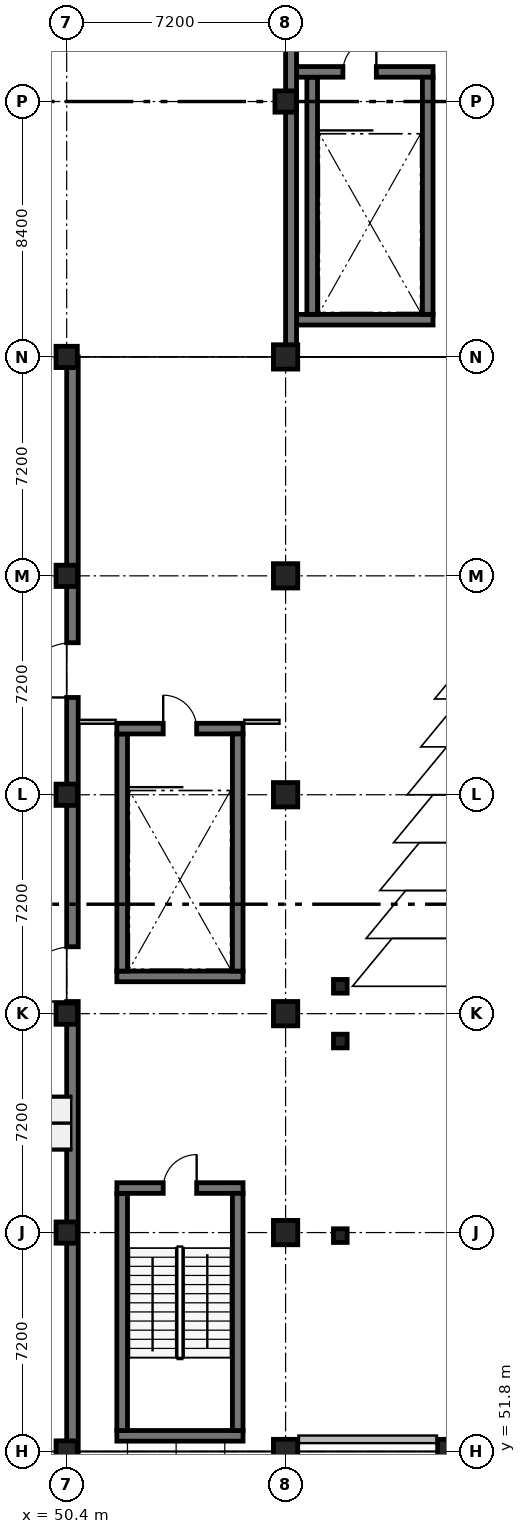
"""IFC4 building model, lengths in metres.
Left out: names, types, materials, properties, quantities, classifications, styles, units other than length and angle.
Written with IfcOpenShell. Run it as: python <this file> out.ifc"""

import sys

from ifc_helpers import new_model, si_unit, direction, frame, frame_2d, origin, origin_2d, place, context, subcontext, project, spatial, rectangle, extrude, element, fill, save


model = new_model("IFC4")
c1 = context("Model", 3, precision=1e-05, world=origin(), true_north=direction((0.0, 1.0)))
c2 = subcontext(c1, "Body", "Model", "MODEL_VIEW")
j1 = project(units=[si_unit("LENGTHUNIT", "METRE"), si_unit("PLANEANGLEUNIT", "RADIAN")], contexts=[c1])
p1 = place(None, origin())
s1 = spatial("IfcSite", under=j1, at=p1, CompositionType="ELEMENT")
p2 = place(p1, origin())
s2 = spatial("IfcBuilding", under=s1, at=p2, CompositionType="ELEMENT")
p3 = place(p2, origin())
s3 = spatial("IfcBuildingStorey", under=s2, at=p3, CompositionType="ELEMENT", Elevation=0.0)
for number, where, z_axis, x_axis in (
    (1, (50.4, 51.8, 0.0), (0.0, 0.0, 1.0), (1.0, 0.0, 0.0)),
    (2, (50.4, 59.0, 0.0), (0.0, 0.0, 1.0), (1.0, 0.0, 0.0)),
    (3, (50.4, 66.2, 0.0), (0.0, 0.0, 1.0), (1.0, 0.0, 0.0)),
    (4, (50.4, 73.4, 0.0), (0.0, 0.0, 1.0), (1.0, 0.0, 0.0)),
    (5, (50.4, 80.6, 0.0), (0.0, 0.0, 1.0), (1.0, 0.0, 0.0)),
    (6, (50.4, 87.8, 0.0), (0.0, 0.0, 1.0), (1.0, 0.0, 0.0)),
):
    element("IfcColumn", number, at=place(p3, frame(where, z_axis=z_axis, x_axis=x_axis)), inside=s3, PredefinedType="COLUMN", context=c2, shape_type="SweptSolid", body=[
        extrude(rectangle(XDim=0.7, YDim=0.7, at=origin_2d()), origin(), (0.0, 0.0, 1.0), 4.8),
    ])
for number, where, z_axis, x_axis in (
    (7, (57.6, 51.8, 0.0), (0.0, 0.0, 1.0), (1.0, 0.0, 0.0)),
    (8, (57.6, 59.0, 0.0), (0.0, 0.0, 1.0), (1.0, 0.0, 0.0)),
    (9, (57.6, 66.2, 0.0), (0.0, 0.0, 1.0), (1.0, 0.0, 0.0)),
    (10, (57.6, 73.4, 0.0), (0.0, 0.0, 1.0), (1.0, 0.0, 0.0)),
    (11, (57.6, 80.6, 0.0), (0.0, 0.0, 1.0), (1.0, 0.0, 0.0)),
    (12, (57.6, 87.8, 0.0), (0.0, 0.0, 1.0), (1.0, 0.0, 0.0)),
):
    element("IfcColumn", number, at=place(p3, frame(where, z_axis=z_axis, x_axis=x_axis)), inside=s3, PredefinedType="COLUMN", context=c2, shape_type="SweptSolid", body=[
        extrude(rectangle(XDim=0.8, YDim=0.8, at=origin_2d()), origin(), (0.0, 0.0, 1.0), 4.8),
    ])
p4 = place(p3, frame((57.6, 96.2, 0.0), z_axis=(0.0, 0.0, 1.0), x_axis=(1.0, 0.0, 0.0)))
e13 = element("IfcColumn", 13, at=p4, inside=s3, PredefinedType="COLUMN", context=c2, shape_type="SweptSolid", body=[
    extrude(rectangle(XDim=0.7, YDim=0.7, at=origin_2d()), origin(), (0.0, 0.0, 1.0), 4.8),
])
p5 = place(p3, frame((63.0, 51.8, 0.0), z_axis=(0.0, 0.0, 1.0), x_axis=(1.0, 0.0, 0.0)))
e14 = element("IfcColumn", 14, at=p5, inside=s3, PredefinedType="COLUMN", context=c2, shape_type="SweptSolid", body=[
    extrude(rectangle(XDim=0.8, YDim=0.8, at=origin_2d()), origin(), (0.0, 0.0, 1.0), 4.8),
])
p6 = place(p3, frame((59.4, 67.1, 0.0), z_axis=(0.0, 0.0, 1.0), x_axis=(1.0, 0.0, 0.0)))
e15 = element("IfcColumn", 15, at=p6, inside=s3, PredefinedType="COLUMN", context=c2, shape_type="SweptSolid", body=[
    extrude(rectangle(XDim=0.45, YDim=0.45, at=origin_2d()), origin(), (0.0, 0.0, 1.0), 1.46),
])
for number, where, z_axis, x_axis in (
    (16, (59.4, 65.3, 0.0), (0.0, 0.0, 1.0), (1.0, 0.0, 0.0)),
    (17, (59.4, 58.9, 0.0), (0.0, 0.0, 1.0), (1.0, 0.0, 0.0)),
):
    element("IfcColumn", number, at=place(p3, frame(where, z_axis=z_axis, x_axis=x_axis)), inside=s3, PredefinedType="COLUMN", context=c2, shape_type="SweptSolid", body=[
        extrude(rectangle(XDim=0.45, YDim=0.45, at=origin_2d()), origin(), (0.0, 0.0, 1.0), 4.8),
    ])
p7 = place(p3, frame((62.45, 89.025, 0.0), z_axis=(0.0, 0.0, 1.0), x_axis=(-1.0, 0.0, 0.0)))
e18 = element("IfcWall", 18, at=p7, inside=s3, PredefinedType="SOLIDWALL", context=c2, shape_type="SweptSolid", body=[
    extrude(rectangle(XDim=4.49, YDim=0.35, at=frame_2d((2.245, 0.0))), origin(), (0.0, 0.0, 1.0), 4.54),
])
p8 = place(p3, frame((58.475, 89.2, 0.0), z_axis=(0.0, 0.0, 1.0), x_axis=(0.0, 1.0, 0.0)))
e19 = element("IfcWall", 19, at=p8, inside=s3, PredefinedType="SOLIDWALL", context=c2, shape_type="SweptSolid", body=[
    extrude(rectangle(XDim=7.8, YDim=0.35, at=frame_2d((3.9, 0.0))), origin(), (0.0, 0.0, 1.0), 4.54),
])
p9 = place(p3, frame((57.96, 97.175, 0.0), z_axis=(0.0, 0.0, 1.0), x_axis=(1.0, 0.0, 0.0)))
e20 = element("IfcWall", 20, at=p9, inside=s3, PredefinedType="SOLIDWALL", context=c2, shape_type="SweptSolid", body=[
    extrude(rectangle(XDim=4.49, YDim=0.35, at=frame_2d((2.245, 0.0))), origin(), (0.0, 0.0, 1.0), 4.54),
])
p10 = place(p9, frame((1.525, 0.0, 0.0)))
e21 = element("IfcOpeningElement", 21, at=p10, cuts=e20, PredefinedType="OPENING", context=c2, shape_type="SweptSolid", body=[
    extrude(rectangle(XDim=1.1, YDim=2.15, at=frame_2d((0.55, 1.075))), frame((0.0, 0.195, 0.0), z_axis=(0.0, -1.0, 0.0), x_axis=(1.0, 0.0, 0.0)), (0.0, 0.0, 1.0), 0.39),
])
p11 = place(p3, frame((62.275, 97.0, 0.0), z_axis=(0.0, 0.0, 1.0), x_axis=(0.0, -1.0, 0.0)))
e22 = element("IfcWall", 22, at=p11, inside=s3, PredefinedType="SOLIDWALL", context=c2, shape_type="SweptSolid", body=[
    extrude(rectangle(XDim=7.8, YDim=0.35, at=frame_2d((3.9, 0.0))), origin(), (0.0, 0.0, 1.0), 4.54),
])
p12 = place(p3, frame((56.2, 52.315, 0.0), z_axis=(0.0, 0.0, 1.0), x_axis=(-1.0, 0.0, 0.0)))
e23 = element("IfcWall", 23, at=p12, inside=s3, PredefinedType="SOLIDWALL", context=c2, shape_type="SweptSolid", body=[
    extrude(rectangle(XDim=4.15, YDim=0.35, at=frame_2d((2.075, 0.0))), origin(), (0.0, 0.0, 1.0), 4.8),
])
p13 = place(p3, frame((52.225, 52.49, 0.0), z_axis=(0.0, 0.0, 1.0), x_axis=(0.0, 1.0, 0.0)))
e24 = element("IfcWall", 24, at=p13, inside=s3, PredefinedType="SOLIDWALL", context=c2, shape_type="SweptSolid", body=[
    extrude(rectangle(XDim=7.8, YDim=0.35, at=frame_2d((3.9, 0.0))), origin(), (0.0, 0.0, 1.0), 4.8),
])
p14 = place(p3, frame((52.05, 60.465, 0.0), z_axis=(0.0, 0.0, 1.0), x_axis=(1.0, 0.0, 0.0)))
e25 = element("IfcWall", 25, at=p14, inside=s3, PredefinedType="SOLIDWALL", context=c2, shape_type="SweptSolid", body=[
    extrude(rectangle(XDim=4.15, YDim=0.35, at=frame_2d((2.075, 0.0))), origin(), (0.0, 0.0, 1.0), 4.8),
])
p15 = place(p14, frame((1.525, 0.0, 0.0)))
e26 = element("IfcOpeningElement", 26, at=p15, cuts=e25, PredefinedType="OPENING", context=c2, shape_type="SweptSolid", body=[
    extrude(rectangle(XDim=1.1, YDim=2.15, at=frame_2d((0.55, 1.075))), frame((0.0, 0.195, 0.0), z_axis=(0.0, -1.0, 0.0), x_axis=(1.0, 0.0, 0.0)), (0.0, 0.0, 1.0), 0.39),
])
p16 = place(p3, frame((56.025, 60.29, 0.0), z_axis=(0.0, 0.0, 1.0), x_axis=(0.0, -1.0, 0.0)))
e27 = element("IfcWall", 27, at=p16, inside=s3, PredefinedType="SOLIDWALL", context=c2, shape_type="SweptSolid", body=[
    extrude(rectangle(XDim=7.8, YDim=0.35, at=frame_2d((3.9, 0.0))), origin(), (0.0, 0.0, 1.0), 4.8),
])
p17 = place(p3, frame((56.2, 67.425, 0.0), z_axis=(0.0, 0.0, 1.0), x_axis=(-1.0, 0.0, 0.0)))
e28 = element("IfcWall", 28, at=p17, inside=s3, PredefinedType="SOLIDWALL", context=c2, shape_type="SweptSolid", body=[
    extrude(rectangle(XDim=4.15, YDim=0.35, at=frame_2d((2.075, 0.0))), origin(), (0.0, 0.0, 1.0), 4.54),
])
p18 = place(p3, frame((52.225, 67.6, 0.0), z_axis=(0.0, 0.0, 1.0), x_axis=(0.0, 1.0, 0.0)))
e29 = element("IfcWall", 29, at=p18, inside=s3, PredefinedType="SOLIDWALL", context=c2, shape_type="SweptSolid", body=[
    extrude(rectangle(XDim=7.8, YDim=0.35, at=frame_2d((3.9, 0.0))), origin(), (0.0, 0.0, 1.0), 4.54),
])
p19 = place(p3, frame((52.05, 75.575, 0.0), z_axis=(0.0, 0.0, 1.0), x_axis=(1.0, 0.0, 0.0)))
e30 = element("IfcWall", 30, at=p19, inside=s3, PredefinedType="SOLIDWALL", context=c2, shape_type="SweptSolid", body=[
    extrude(rectangle(XDim=4.15, YDim=0.35, at=frame_2d((2.075, 0.0))), origin(), (0.0, 0.0, 1.0), 4.54),
])
p20 = place(p19, frame((1.525, 0.0, 0.0)))
e31 = element("IfcOpeningElement", 31, at=p20, cuts=e30, PredefinedType="OPENING", context=c2, shape_type="SweptSolid", body=[
    extrude(rectangle(XDim=1.1, YDim=2.15, at=frame_2d((0.55, 1.075))), frame((0.0, 0.195, 0.0), z_axis=(0.0, -1.0, 0.0), x_axis=(1.0, 0.0, 0.0)), (0.0, 0.0, 1.0), 0.39),
])
p21 = place(p3, frame((56.025, 75.4, 0.0), z_axis=(0.0, 0.0, 1.0), x_axis=(0.0, -1.0, 0.0)))
e32 = element("IfcWall", 32, at=p21, inside=s3, PredefinedType="SOLIDWALL", context=c2, shape_type="SweptSolid", body=[
    extrude(rectangle(XDim=7.8, YDim=0.35, at=frame_2d((3.9, 0.0))), origin(), (0.0, 0.0, 1.0), 4.54),
])
p22 = place(p3, frame((50.59, 51.8, 0.0), z_axis=(0.0, 0.0, 1.0), x_axis=(0.0, 1.0, 0.0)))
e33 = element("IfcWall", 33, at=p22, inside=s3, PredefinedType="SOLIDWALL", context=c2, shape_type="SweptSolid", body=[
    extrude(rectangle(XDim=36.0, YDim=0.38, at=frame_2d((18.0, 0.0))), origin(), (0.0, 0.0, 1.0), 4.54),
])
p23 = place(p22, frame((14.8, 0.0, 0.0)))
e34 = element("IfcOpeningElement", 34, at=p23, cuts=e33, PredefinedType="OPENING", context=c2, shape_type="SweptSolid", body=[
    extrude(rectangle(XDim=1.8, YDim=2.2, at=frame_2d((0.9, 1.1))), frame((0.0, 0.21, 0.0), z_axis=(0.0, -1.0, 0.0), x_axis=(1.0, 0.0, 0.0)), (0.0, 0.0, 1.0), 0.42),
])
p24 = place(p22, frame((24.8, 0.0, 0.0)))
e35 = element("IfcOpeningElement", 35, at=p24, cuts=e33, PredefinedType="OPENING", context=c2, shape_type="SweptSolid", body=[
    extrude(rectangle(XDim=1.8, YDim=2.2, at=frame_2d((0.9, 1.1))), frame((0.0, 0.21, 0.0), z_axis=(0.0, -1.0, 0.0), x_axis=(1.0, 0.0, 0.0)), (0.0, 0.0, 1.0), 0.42),
])
p25 = place(p3, frame((57.78, 87.8, 0.0), z_axis=(0.0, 0.0, 1.0), x_axis=(0.0, 1.0, 0.0)))
e36 = element("IfcWall", 36, at=p25, inside=s3, PredefinedType="SOLIDWALL", context=c2, shape_type="SweptSolid", body=[
    extrude(rectangle(XDim=24.0, YDim=0.36, at=frame_2d((12.0, 0.0))), origin(), (0.0, 0.0, 1.0), 4.54),
])
p26 = place(p3, frame((62.58, 52.2, 0.0), z_axis=(0.0, 0.0, 1.0), x_axis=(-1.0, 0.0, 0.0)))
e37 = element("IfcWall", 37, at=p26, inside=s3, PredefinedType="PARTITIONING", context=c2, shape_type="SweptSolid", body=[
    extrude(rectangle(XDim=4.56, YDim=0.25, at=frame_2d((2.28, 0.0))), origin(), (0.0, 0.0, 1.0), 4.54),
])
p27 = place(p3, frame((50.8, 75.8, 0.0), z_axis=(0.0, 0.0, 1.0), x_axis=(1.0, 0.0, 0.0)))
e38 = element("IfcWall", 38, at=p27, inside=s3, PredefinedType="PARTITIONING", context=c2, shape_type="SweptSolid", body=[
    extrude(rectangle(XDim=1.21, YDim=0.13, at=frame_2d((0.605, 0.0))), origin(), (0.0, 0.0, 1.0), 4.54),
])
p28 = place(p3, frame((56.24, 75.8, 0.0), z_axis=(0.0, 0.0, 1.0), x_axis=(1.0, 0.0, 0.0)))
e39 = element("IfcWall", 39, at=p28, inside=s3, PredefinedType="PARTITIONING", context=c2, shape_type="SweptSolid", body=[
    extrude(rectangle(XDim=1.16, YDim=0.13, at=frame_2d((0.58, 0.0))), origin(), (0.0, 0.0, 1.0), 4.54),
])
p29 = place(p10, origin())
e40 = element("IfcDoor", 40, at=p29, inside=s3, OperationType="SINGLE_SWING_RIGHT", PredefinedType="DOOR", context=c2, shape_type="SweptSolid", body=[
    extrude(rectangle(XDim=1.1, YDim=2.15, at=frame_2d((0.55, 1.075))), frame((0.0, 0.025, 0.0), z_axis=(0.0, -1.0, 0.0), x_axis=(1.0, 0.0, 0.0)), (0.0, 0.0, 1.0), 0.05),
])
fill(e21, e40)
p30 = place(p15, origin())
e41 = element("IfcDoor", 41, at=p30, inside=s3, OperationType="SINGLE_SWING_RIGHT", PredefinedType="DOOR", context=c2, shape_type="SweptSolid", body=[
    extrude(rectangle(XDim=1.1, YDim=2.15, at=frame_2d((0.55, 1.075))), frame((0.0, 0.025, 0.0), z_axis=(0.0, -1.0, 0.0), x_axis=(1.0, 0.0, 0.0)), (0.0, 0.0, 1.0), 0.05),
])
fill(e26, e41)
p31 = place(p20, origin())
e42 = element("IfcDoor", 42, at=p31, inside=s3, OperationType="SINGLE_SWING_LEFT", PredefinedType="DOOR", context=c2, shape_type="SweptSolid", body=[
    extrude(rectangle(XDim=1.1, YDim=2.15, at=frame_2d((0.55, 1.075))), frame((0.0, 0.025, 0.0), z_axis=(0.0, -1.0, 0.0), x_axis=(1.0, 0.0, 0.0)), (0.0, 0.0, 1.0), 0.05),
])
fill(e31, e42)
p32 = place(p23, origin())
e43 = element("IfcDoor", 43, at=p32, inside=s3, OperationType="SINGLE_SWING_LEFT", PredefinedType="DOOR", context=c2, shape_type="SweptSolid", body=[
    extrude(rectangle(XDim=1.8, YDim=2.2, at=frame_2d((0.9, 1.1))), frame((0.0, 0.025, 0.0), z_axis=(0.0, -1.0, 0.0), x_axis=(1.0, 0.0, 0.0)), (0.0, 0.0, 1.0), 0.05),
])
fill(e34, e43)
p33 = place(p24, origin())
e44 = element("IfcDoor", 44, at=p33, inside=s3, OperationType="SINGLE_SWING_LEFT", PredefinedType="DOOR", context=c2, shape_type="SweptSolid", body=[
    extrude(rectangle(XDim=1.8, YDim=2.2, at=frame_2d((0.9, 1.1))), frame((0.0, 0.025, 0.0), z_axis=(0.0, -1.0, 0.0), x_axis=(1.0, 0.0, 0.0)), (0.0, 0.0, 1.0), 0.05),
])
fill(e35, e44)
save(model, sys.argv[1])
